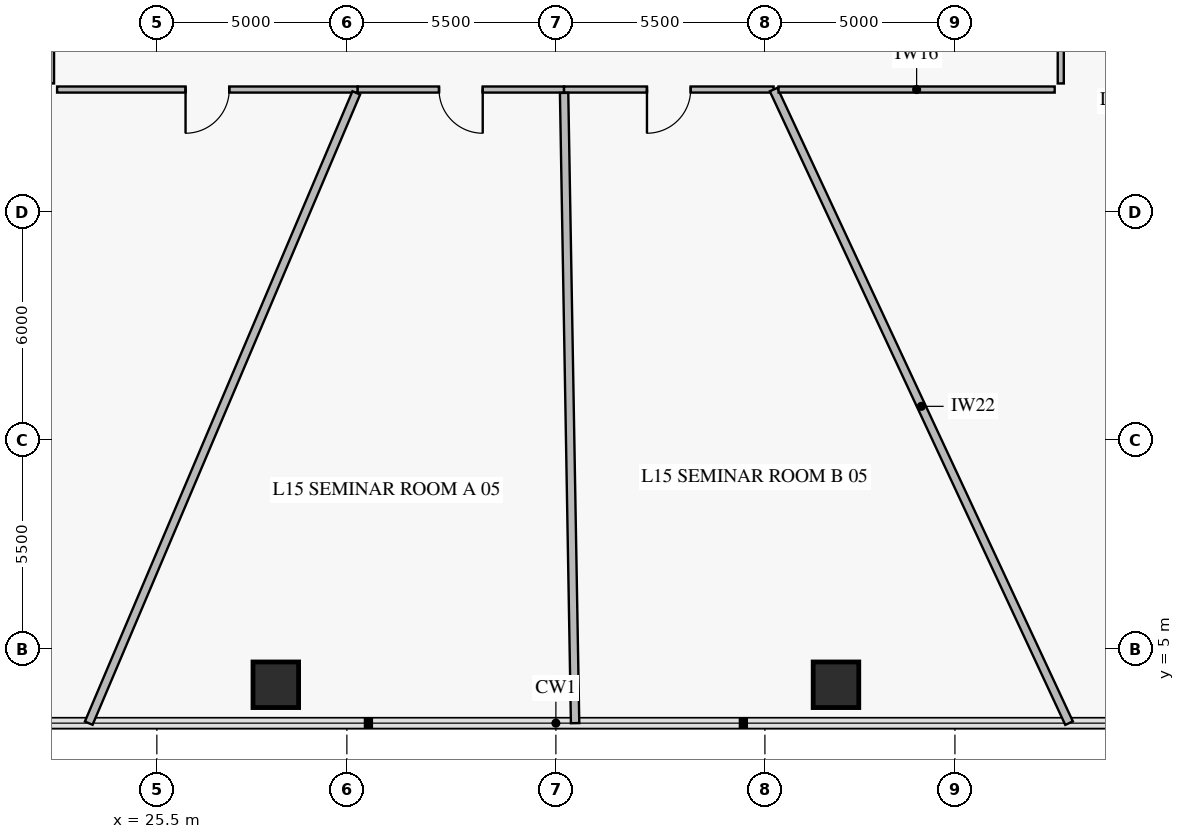
"""IFC4 building model, lengths in metres.
Left out: names, types, materials, properties, quantities, classifications, styles, units other than length and angle.
Written with IfcOpenShell. Run it as: python <this file> out.ifc"""

import sys

from ifc_helpers import new_model, si_unit, direction, frame, frame_2d, origin, origin_2d, place, context, subcontext, project, spatial, rectangle, extrude, element, fill, save


model = new_model("IFC4")
c1 = context("Model", 3, precision=1e-05, world=origin(), true_north=direction((0.0, 1.0)))
c2 = subcontext(c1, "Body", "Model", "MODEL_VIEW")
j1 = project(units=[si_unit("LENGTHUNIT", "METRE"), si_unit("PLANEANGLEUNIT", "RADIAN")], contexts=[c1])
p1 = place(None, origin())
s1 = spatial("IfcSite", under=j1, at=p1, CompositionType="ELEMENT")
p2 = place(p1, origin())
s2 = spatial("IfcBuilding", under=s1, at=p2, CompositionType="ELEMENT")
p3 = place(p2, frame((0.0, 0.0, 62.4)))
s3 = spatial("IfcBuildingStorey", under=s2, at=p3, CompositionType="ELEMENT", Elevation=62.4)
for number, where, z_axis, x_axis in (
    (1, (28.63, 4.052, 0.0), (0.0, 0.0, 1.0), (1.0, 0.0, 0.0)),
    (2, (43.37, 4.052, 0.0), (0.0, 0.0, 1.0), (1.0, 0.0, 0.0)),
):
    element("IfcColumn", number, at=place(p3, frame(where, z_axis=z_axis, x_axis=x_axis)), inside=s3, PredefinedType="COLUMN", context=c2, shape_type="SweptSolid", body=[
        extrude(rectangle(XDim=1.2, YDim=1.2, at=origin_2d()), origin(), (0.0, 0.0, 1.0), 3.92),
    ])
p4 = place(p3, frame((22.875, 19.715, 0.0), z_axis=(0.0, 0.0, 1.0), x_axis=(1.0, 0.0, 0.0)))
e3 = element("IfcWall", 3, at=p4, inside=s3, PredefinedType="PARTITIONING", context=c2, shape_type="SweptSolid", body=[
    extrude(rectangle(XDim=7.91, YDim=0.16, at=frame_2d((3.955, 0.0))), origin(), (0.0, 0.0, 1.0), 3.22),
])
p5 = place(p4, frame((3.38, 0.0, 0.0)))
e4 = element("IfcOpeningElement", 4, at=p5, cuts=e3, PredefinedType="OPENING", context=c2, shape_type="SweptSolid", body=[
    extrude(rectangle(XDim=1.15, YDim=2.2, at=frame_2d((0.575, 1.1))), frame((0.0, 0.092, 0.0), z_axis=(0.0, -1.0, 0.0), x_axis=(1.0, 0.0, 0.0)), (0.0, 0.0, 1.0), 0.184),
])
p6 = place(p3, frame((30.785, 19.715, 0.0), z_axis=(0.0, 0.0, 1.0), x_axis=(1.0, 0.0, 0.0)))
e5 = element("IfcWall", 5, at=p6, inside=s3, PredefinedType="PARTITIONING", context=c2, shape_type="SweptSolid", body=[
    extrude(rectangle(XDim=5.429, YDim=0.16, at=frame_2d((2.714, 0.0))), origin(), (0.0, 0.0, 1.0), 3.22),
])
p7 = place(p6, frame((2.139, 0.0, 0.0)))
e6 = element("IfcOpeningElement", 6, at=p7, cuts=e5, PredefinedType="OPENING", context=c2, shape_type="SweptSolid", body=[
    extrude(rectangle(XDim=1.15, YDim=2.2, at=frame_2d((0.575, 1.1))), frame((0.0, 0.092, 0.0), z_axis=(0.0, -1.0, 0.0), x_axis=(1.0, 0.0, 0.0)), (0.0, 0.0, 1.0), 0.184),
])
p8 = place(p3, frame((36.214, 19.715, 0.0), z_axis=(0.0, 0.0, 1.0), x_axis=(1.0, 0.0, 0.0)))
e7 = element("IfcWall", 7, at=p8, inside=s3, PredefinedType="PARTITIONING", context=c2, shape_type="SweptSolid", body=[
    extrude(rectangle(XDim=5.514, YDim=0.16, at=frame_2d((2.757, 0.0))), origin(), (0.0, 0.0, 1.0), 3.22),
])
p9 = place(p8, frame((2.182, 0.0, 0.0)))
e8 = element("IfcOpeningElement", 8, at=p9, cuts=e7, PredefinedType="OPENING", context=c2, shape_type="SweptSolid", body=[
    extrude(rectangle(XDim=1.15, YDim=2.2, at=frame_2d((0.575, 1.1))), frame((0.0, 0.092, 0.0), z_axis=(0.0, -1.0, 0.0), x_axis=(1.0, 0.0, 0.0)), (0.0, 0.0, 1.0), 0.184),
])
p10 = place(p3, frame((49.285, 19.875, 0.0), z_axis=(0.0, 0.0, 1.0), x_axis=(0.0, 1.0, 0.0)))
e9 = element("IfcWall", 9, at=p10, inside=s3, PredefinedType="PARTITIONING", context=c2, shape_type="SweptSolid", body=[
    extrude(rectangle(XDim=8.063, YDim=0.16, at=frame_2d((4.032, 0.0))), origin(), (0.0, 0.0, 1.0), 3.92),
])
p11 = place(p10, frame((3.557, 0.0, 0.0)))
e10 = element("IfcOpeningElement", 10, at=p11, cuts=e9, PredefinedType="OPENING", context=c2, shape_type="SweptSolid", body=[
    extrude(rectangle(XDim=0.95, YDim=2.1, at=frame_2d((0.475, 1.05))), frame((0.0, 0.092, 0.0), z_axis=(0.0, -1.0, 0.0), x_axis=(1.0, 0.0, 0.0)), (0.0, 0.0, 1.0), 0.184),
])
p12 = place(p3, frame((22.715, 27.301, 0.0), z_axis=(0.0, 0.0, 1.0), x_axis=(0.0, -1.0, 0.0)))
e11 = element("IfcWall", 11, at=p12, inside=s3, PredefinedType="PARTITIONING", context=c2, shape_type="SweptSolid", body=[
    extrude(rectangle(XDim=7.426, YDim=0.16, at=frame_2d((3.713, 0.0))), origin(), (0.0, 0.0, 1.0), 3.92),
])
p13 = place(p3, frame((30.748, 19.627, 0.0), z_axis=(0.0, 0.0, 1.0), x_axis=(-0.39073948494, -0.920501306305, 0.0)))
e12 = element("IfcWall", 12, at=p13, inside=s3, PredefinedType="PARTITIONING", context=c2, shape_type="SweptSolid", body=[
    extrude(rectangle(XDim=18.018, YDim=0.22, at=frame_2d((9.009, 0.0))), origin(), (0.0, 0.0, 1.0), 3.17),
])
p14 = place(p3, frame((36.216, 19.627, 0.0), z_axis=(0.0, 0.0, 1.0), x_axis=(0.01745546123, -0.99984764183, 0.0)))
e13 = element("IfcWall", 13, at=p14, inside=s3, PredefinedType="PARTITIONING", context=c2, shape_type="SweptSolid", body=[
    extrude(rectangle(XDim=16.588, YDim=0.22, at=frame_2d((8.294, 0.0))), origin(), (0.0, 0.0, 1.0), 3.17),
])
p15 = place(p3, frame((41.729, 19.715, 0.0), z_axis=(0.0, 0.0, 1.0), x_axis=(0.422623913369, -0.906305151617, 0.0)))
e14 = element("IfcWall", 14, at=p15, inside=s3, PredefinedType="PARTITIONING", context=c2, shape_type="SweptSolid", body=[
    extrude(rectangle(XDim=18.397, YDim=0.22, at=frame_2d((9.199, 0.0))), origin(), (0.0, 0.0, 1.0), 3.17),
])
p16 = place(p3, frame((41.859, 19.715, 0.0), z_axis=(0.0, 0.0, 1.0), x_axis=(1.0, 0.0, 0.0)))
e15 = element("IfcWall", 15, at=p16, inside=s3, PredefinedType="PARTITIONING", context=c2, shape_type="SweptSolid", body=[
    extrude(rectangle(XDim=7.266, YDim=0.16, at=frame_2d((3.633, 0.0))), origin(), (0.0, 0.0, 1.0), 3.22),
])
p17 = place(p5, frame((1.15, 0.0, 0.0), z_axis=(0.0, 0.0, 1.0), x_axis=(-1.0, 0.0, 0.0)))
e16 = element("IfcDoor", 16, at=p17, inside=s3, OperationType="SINGLE_SWING_RIGHT", PredefinedType="DOOR", context=c2, shape_type="SweptSolid", body=[
    extrude(rectangle(XDim=1.15, YDim=2.2, at=frame_2d((0.575, 1.1))), frame((0.0, 0.025, 0.0), z_axis=(0.0, -1.0, 0.0), x_axis=(1.0, 0.0, 0.0)), (0.0, 0.0, 1.0), 0.05),
])
fill(e4, e16)
p18 = place(p7, frame((1.15, 0.0, 0.0), z_axis=(0.0, 0.0, 1.0), x_axis=(-1.0, 0.0, 0.0)))
e17 = element("IfcDoor", 17, at=p18, inside=s3, OperationType="SINGLE_SWING_LEFT", PredefinedType="DOOR", context=c2, shape_type="SweptSolid", body=[
    extrude(rectangle(XDim=1.15, YDim=2.2, at=frame_2d((0.575, 1.1))), frame((0.0, 0.025, 0.0), z_axis=(0.0, -1.0, 0.0), x_axis=(1.0, 0.0, 0.0)), (0.0, 0.0, 1.0), 0.05),
])
fill(e6, e17)
p19 = place(p9, frame((1.15, 0.0, 0.0), z_axis=(0.0, 0.0, 1.0), x_axis=(-1.0, 0.0, 0.0)))
e18 = element("IfcDoor", 18, at=p19, inside=s3, OperationType="SINGLE_SWING_RIGHT", PredefinedType="DOOR", context=c2, shape_type="SweptSolid", body=[
    extrude(rectangle(XDim=1.15, YDim=2.2, at=frame_2d((0.575, 1.1))), frame((0.0, 0.025, 0.0), z_axis=(0.0, -1.0, 0.0), x_axis=(1.0, 0.0, 0.0)), (0.0, 0.0, 1.0), 0.05),
])
fill(e8, e18)
save(model, sys.argv[1])
